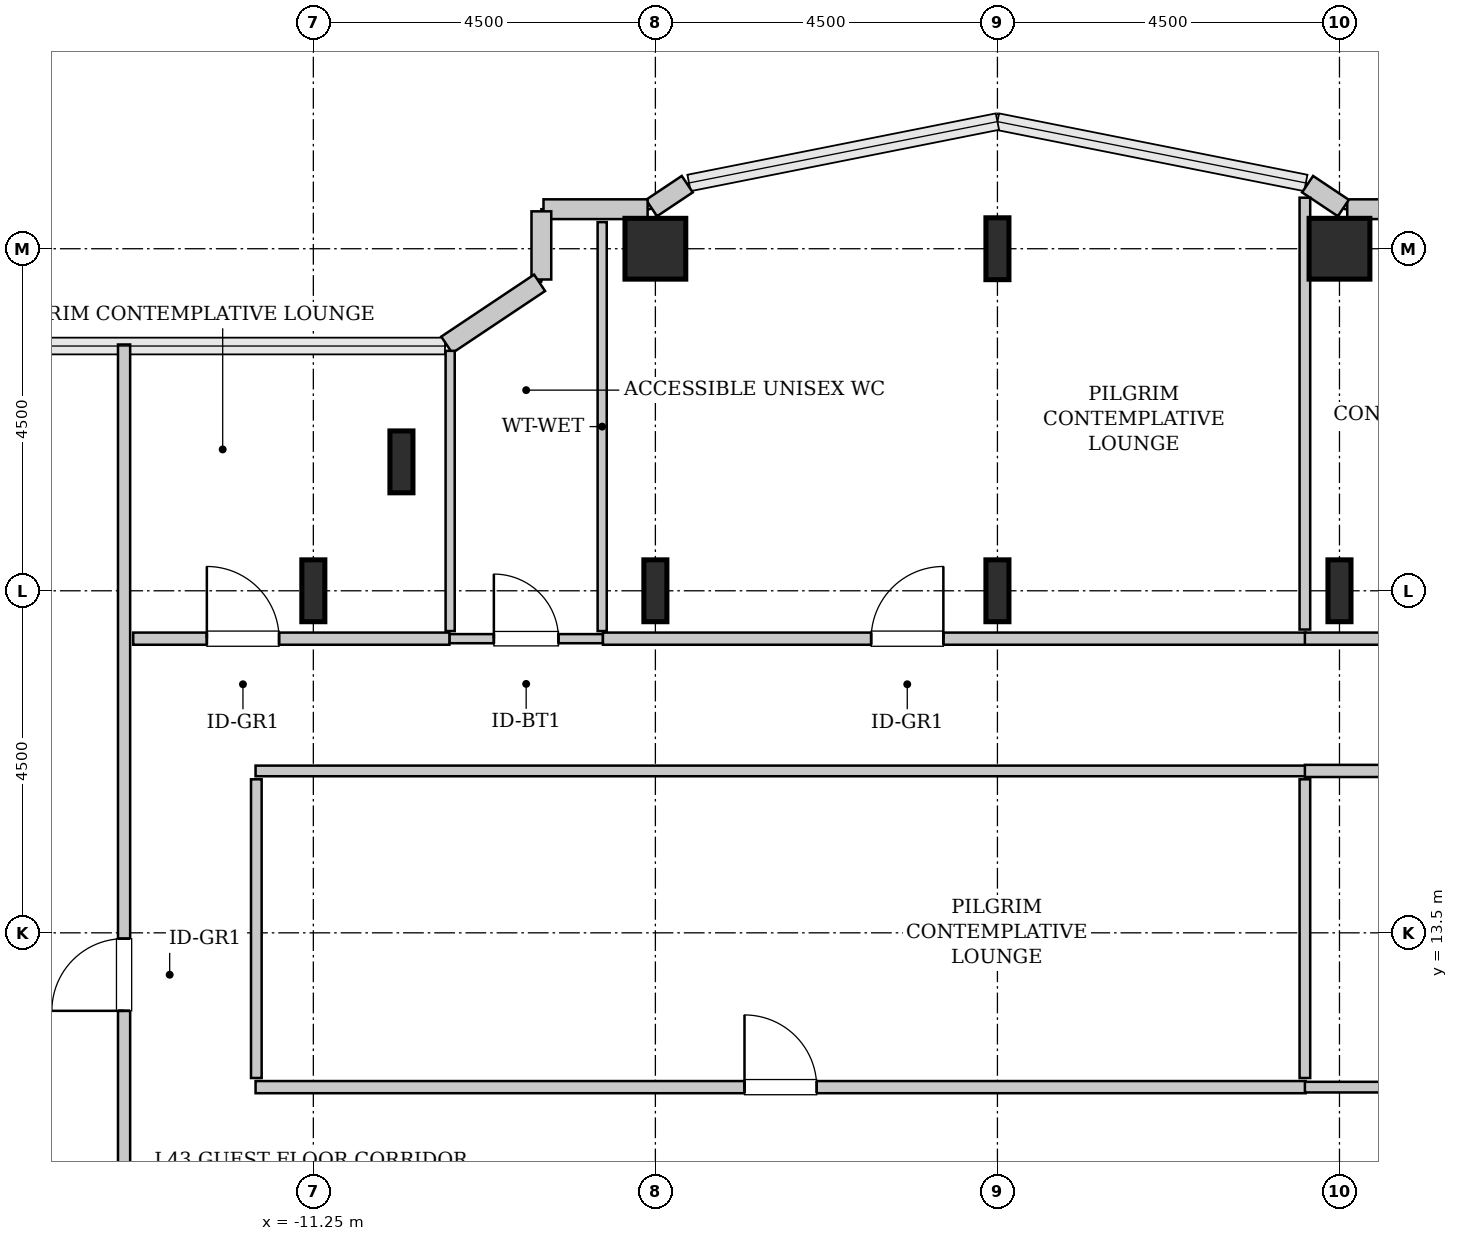
"""IFC4 building model, lengths in metres.
Left out: names, types, materials, properties, quantities, classifications, styles, units other than length and angle.
Written with IfcOpenShell. Run it as: python <this file> out.ifc"""

import sys

from ifc_helpers import new_model, si_unit, direction, frame, frame_2d, origin, origin_2d, place, context, subcontext, project, spatial, rectangle, hollow_rectangle, i_section, extrude, source, transform, mapped, element, fill, save


model = new_model("IFC4")
c1 = context("Model", 3, precision=1e-05, world=origin(), true_north=direction((0.0, 1.0)))
c2 = subcontext(c1, "Body", "Model", "MODEL_VIEW")
j1 = project(units=[si_unit("LENGTHUNIT", "METRE"), si_unit("PLANEANGLEUNIT", "RADIAN")], contexts=[c1])
p1 = place(None, origin())
s1 = spatial("IfcSite", under=j1, at=p1, CompositionType="ELEMENT")
p2 = place(p1, origin())
s2 = spatial("IfcBuilding", under=s1, at=p2, CompositionType="ELEMENT")
p3 = place(p2, frame((0.0, 0.0, 175.4)))
s3 = spatial("IfcBuildingStorey", under=s2, at=p3, CompositionType="ELEMENT", Elevation=175.4)
m1 = source(origin(), c2, "Body", "SweptSolid", [
    extrude(i_section(OverallWidth=0.303, OverallDepth=0.814, WebThickness=0.021, FlangeThickness=0.04, FilletRadius=0.03, at=origin_2d()), origin(), (0.0, 0.0, 1.0), 3.8),
])
for number, where, z_axis, x_axis in (
    (1, (-11.25, 18.0, 0.0), (0.0, 0.0, 1.0), (1.0, 0.0, 0.0)),
    (2, (-10.091, 19.696, 0.0), (0.0, 0.0, 1.0), (1.0, 0.0, 0.0)),
    (3, (-6.75, 18.0, 0.0), (0.0, 0.0, 1.0), (1.0, 0.0, 0.0)),
):
    element("IfcColumn", number, at=place(p3, frame(where, z_axis=z_axis, x_axis=x_axis)), inside=s3, PredefinedType="COLUMN", context=c2, shape_type="MappedRepresentation", body=[
        mapped(m1, transform((0.0, 0.0, 0.0), x_axis=(1.0, 0.0, 0.0), y_axis=(0.0, 1.0, 0.0), z_axis=(0.0, 0.0, 1.0), scale=1.0)),
    ])
m2 = source(origin(), c2, "Body", "SweptSolid", [
    extrude(hollow_rectangle(XDim=0.8, YDim=0.8, WallThickness=0.04, InnerFilletRadius=0.04, OuterFilletRadius=0.08, at=origin_2d()), origin(), (0.0, 0.0, 1.0), 3.8),
])
p4 = place(p3, frame((-6.75, 22.5, 0.0), z_axis=(0.0, 0.0, 1.0), x_axis=(1.0, 0.0, 0.0)))
e4 = element("IfcColumn", 4, at=p4, inside=s3, PredefinedType="COLUMN", context=c2, shape_type="MappedRepresentation", body=[
    mapped(m2, transform((0.0, 0.0, 0.0), x_axis=(1.0, 0.0, 0.0), y_axis=(0.0, 1.0, 0.0), z_axis=(0.0, 0.0, 1.0), scale=1.0)),
])
for number, where, z_axis, x_axis in (
    (5, (-2.25, 18.0, 0.0), (0.0, 0.0, 1.0), (1.0, 0.0, 0.0)),
    (6, (-2.25, 22.5, 0.0), (0.0, 0.0, 1.0), (1.0, 0.0, 0.0)),
    (7, (2.25, 18.0, 0.0), (0.0, 0.0, 1.0), (1.0, 0.0, 0.0)),
):
    element("IfcColumn", number, at=place(p3, frame(where, z_axis=z_axis, x_axis=x_axis)), inside=s3, PredefinedType="COLUMN", context=c2, shape_type="MappedRepresentation", body=[
        mapped(m1, transform((0.0, 0.0, 0.0), x_axis=(1.0, 0.0, 0.0), y_axis=(0.0, 1.0, 0.0), z_axis=(0.0, 0.0, 1.0), scale=1.0)),
    ])
p5 = place(p3, frame((2.25, 22.5, 0.0), z_axis=(0.0, 0.0, 1.0), x_axis=(1.0, 0.0, 0.0)))
e8 = element("IfcColumn", 8, at=p5, inside=s3, PredefinedType="COLUMN", context=c2, shape_type="MappedRepresentation", body=[
    mapped(m2, transform((0.0, 0.0, 0.0), x_axis=(1.0, 0.0, 0.0), y_axis=(0.0, 1.0, 0.0), z_axis=(0.0, 0.0, 1.0), scale=1.0)),
])
m3 = source(origin(), c2, "Body", "SweptSolid", [
    extrude(rectangle(XDim=1.37, YDim=0.26, at=frame_2d((0.685, 0.0))), origin(), (0.0, 0.0, 1.0), 3.55),
])
p6 = place(p3, frame((3.722, 23.02, 0.0), z_axis=(0.0, 0.0, 1.0), x_axis=(-1.0, 0.0, 0.0)))
e9 = element("IfcWall", 9, at=p6, inside=s3, PredefinedType="SOLIDWALL", context=c2, shape_type="MappedRepresentation", body=[
    mapped(m3, transform((0.0, 0.0, 0.0), x_axis=(1.0, 0.0, 0.0), y_axis=(0.0, 1.0, 0.0), z_axis=(0.0, 0.0, 1.0), scale=1.0)),
])
m4 = source(origin(), c2, "Body", "SweptSolid", [
    extrude(rectangle(XDim=0.565, YDim=0.26, at=frame_2d((0.283, 0.0))), origin(), (0.0, 0.0, 1.0), 3.55),
])
for number, where, z_axis, x_axis in (
    (10, (2.301, 23.036, 0.0), (0.0, 0.0, 1.0), (-0.832, 0.555, 0.0)),
    (11, (-6.331, 23.35, 0.0), (0.0, 0.0, 1.0), (-0.832, -0.555, 0.0)),
):
    element("IfcWall", number, at=place(p3, frame(where, z_axis=z_axis, x_axis=x_axis)), inside=s3, PredefinedType="SOLIDWALL", context=c2, shape_type="MappedRepresentation", body=[
        mapped(m4, transform((0.0, 0.0, 0.0), x_axis=(1.0, 0.0, 0.0), y_axis=(0.0, 1.0, 0.0), z_axis=(0.0, 0.0, 1.0), scale=1.0)),
    ])
p7 = place(p3, frame((-6.852, 23.02, 0.0), z_axis=(0.0, 0.0, 1.0), x_axis=(-1.0, 0.0, 0.0)))
e12 = element("IfcWall", 12, at=p7, inside=s3, PredefinedType="SOLIDWALL", context=c2, shape_type="MappedRepresentation", body=[
    mapped(m3, transform((0.0, 0.0, 0.0), x_axis=(1.0, 0.0, 0.0), y_axis=(0.0, 1.0, 0.0), z_axis=(0.0, 0.0, 1.0), scale=1.0)),
])
m5 = source(origin(), c2, "Body", "SweptSolid", [
    extrude(rectangle(XDim=0.897, YDim=0.26, at=frame_2d((0.448, 0.0))), origin(), (0.0, 0.0, 1.0), 3.55),
])
p8 = place(p3, frame((-8.25, 22.992, 0.0), z_axis=(0.0, 0.0, 1.0), x_axis=(0.0, -1.0, 0.0)))
e13 = element("IfcWall", 13, at=p8, inside=s3, PredefinedType="SOLIDWALL", context=c2, shape_type="MappedRepresentation", body=[
    mapped(m5, transform((0.0, 0.0, 0.0), x_axis=(1.0, 0.0, 0.0), y_axis=(0.0, 1.0, 0.0), z_axis=(0.0, 0.0, 1.0), scale=1.0)),
])
m6 = source(origin(), c2, "Body", "SweptSolid", [
    extrude(rectangle(XDim=1.469, YDim=0.26, at=frame_2d((0.734, 0.0))), origin(), (0.0, 0.0, 1.0), 3.55),
])
p9 = place(p3, frame((-8.273, 22.052, 0.0), z_axis=(0.0, 0.0, 1.0), x_axis=(-0.831461760506, -0.555581983884, 0.0)))
e14 = element("IfcWall", 14, at=p9, inside=s3, PredefinedType="SOLIDWALL", context=c2, shape_type="MappedRepresentation", body=[
    mapped(m6, transform((0.0, 0.0, 0.0), x_axis=(1.0, 0.0, 0.0), y_axis=(0.0, 1.0, 0.0), z_axis=(0.0, 0.0, 1.0), scale=1.0)),
])
m7 = source(origin(), c2, "Body", "SweptSolid", [
    extrude(rectangle(XDim=2.02, YDim=0.12, at=frame_2d((1.01, 0.0))), origin(), (0.0, 0.0, 1.0), 3.535),
])
p10 = place(p3, frame((-9.46, 17.37, 0.0), z_axis=(0.0, 0.0, 1.0), x_axis=(1.0, 0.0, 0.0)))
e15 = element("IfcWall", 15, at=p10, inside=s3, PredefinedType="PLUMBINGWALL", context=c2, shape_type="MappedRepresentation", body=[
    mapped(m7, transform((0.0, 0.0, 0.0), x_axis=(1.0, 0.0, 0.0), y_axis=(0.0, 1.0, 0.0), z_axis=(0.0, 0.0, 1.0), scale=1.0)),
])
p11 = place(p10, frame((0.585, 0.0, 0.0)))
e16 = element("IfcOpeningElement", 16, at=p11, cuts=e15, PredefinedType="OPENING", context=c2, shape_type="SweptSolid", body=[
    extrude(rectangle(XDim=0.85, YDim=2.1, at=frame_2d((0.425, 1.05))), frame((0.0, 0.07, 0.0), z_axis=(0.0, -1.0, 0.0), x_axis=(1.0, 0.0, 0.0)), (0.0, 0.0, 1.0), 0.14),
])
m8 = source(origin(), c2, "Body", "SweptSolid", [
    extrude(rectangle(XDim=5.38, YDim=0.12, at=frame_2d((2.69, 0.0))), origin(), (0.0, 0.0, 1.0), 3.535),
])
p12 = place(p3, frame((-7.45, 17.47, 0.0), z_axis=(0.0, 0.0, 1.0), x_axis=(0.0, 1.0, 0.0)))
e17 = element("IfcWall", 17, at=p12, inside=s3, PredefinedType="PLUMBINGWALL", context=c2, shape_type="MappedRepresentation", body=[
    mapped(m8, transform((0.0, 0.0, 0.0), x_axis=(1.0, 0.0, 0.0), y_axis=(0.0, 1.0, 0.0), z_axis=(0.0, 0.0, 1.0), scale=1.0)),
])
m9 = source(origin(), c2, "Body", "SweptSolid", [
    extrude(rectangle(XDim=3.687, YDim=0.12, at=frame_2d((1.843, 0.0))), origin(), (0.0, 0.0, 1.0), 3.535),
])
p13 = place(p3, frame((-9.45, 17.47, 0.0), z_axis=(0.0, 0.0, 1.0), x_axis=(0.0, 1.0, 0.0)))
e18 = element("IfcWall", 18, at=p13, inside=s3, PredefinedType="PLUMBINGWALL", context=c2, shape_type="MappedRepresentation", body=[
    mapped(m9, transform((0.0, 0.0, 0.0), x_axis=(1.0, 0.0, 0.0), y_axis=(0.0, 1.0, 0.0), z_axis=(0.0, 0.0, 1.0), scale=1.0)),
])
m10 = source(origin(), c2, "Body", "SweptSolid", [
    extrude(rectangle(XDim=12.752, YDim=0.16, at=frame_2d((6.376, 0.0))), origin(), (0.0, 0.0, 1.0), 3.535),
])
p14 = place(p3, frame((-13.74, 8.488, 0.0), z_axis=(0.0, 0.0, 1.0), x_axis=(0.0, 1.0, 0.0)))
e19 = element("IfcWall", 19, at=p14, inside=s3, PredefinedType="PARTITIONING", context=c2, shape_type="MappedRepresentation", body=[
    mapped(m10, transform((0.0, 0.0, 0.0), x_axis=(1.0, 0.0, 0.0), y_axis=(0.0, 1.0, 0.0), z_axis=(0.0, 0.0, 1.0), scale=1.0)),
])
p15 = place(p14, frame((3.986, 0.0, 0.0)))
e20 = element("IfcOpeningElement", 20, at=p15, cuts=e19, PredefinedType="OPENING", context=c2, shape_type="SweptSolid", body=[
    extrude(rectangle(XDim=0.95, YDim=2.1, at=frame_2d((0.475, 1.05))), frame((0.0, 0.09, 0.0), z_axis=(0.0, -1.0, 0.0), x_axis=(1.0, 0.0, 0.0)), (0.0, 0.0, 1.0), 0.18),
])
m11 = source(origin(), c2, "Body", "SweptSolid", [
    extrude(rectangle(XDim=13.815, YDim=0.16, at=frame_2d((6.907, 0.0))), origin(), (0.0, 0.0, 1.0), 3.535),
])
p16 = place(p3, frame((-12.01, 11.47, 0.0), z_axis=(0.0, 0.0, 1.0), x_axis=(1.0, 0.0, 0.0)))
e21 = element("IfcWall", 21, at=p16, inside=s3, PredefinedType="PARTITIONING", context=c2, shape_type="MappedRepresentation", body=[
    mapped(m11, transform((0.0, 0.0, 0.0), x_axis=(1.0, 0.0, 0.0), y_axis=(0.0, 1.0, 0.0), z_axis=(0.0, 0.0, 1.0), scale=1.0)),
])
p17 = place(p16, frame((6.433, 0.0, 0.0)))
e22 = element("IfcOpeningElement", 22, at=p17, cuts=e21, PredefinedType="OPENING", context=c2, shape_type="SweptSolid", body=[
    extrude(rectangle(XDim=0.95, YDim=2.1, at=frame_2d((0.475, 1.05))), frame((0.0, 0.09, 0.0), z_axis=(0.0, -1.0, 0.0), x_axis=(1.0, 0.0, 0.0)), (0.0, 0.0, 1.0), 0.18),
])
m12 = source(origin(), c2, "Body", "SweptSolid", [
    extrude(rectangle(XDim=13.815, YDim=0.14, at=frame_2d((6.907, 0.0))), origin(), (0.0, 0.0, 1.0), 3.535),
])
p18 = place(p3, frame((-12.01, 15.63, 0.0), z_axis=(0.0, 0.0, 1.0), x_axis=(1.0, 0.0, 0.0)))
e23 = element("IfcWall", 23, at=p18, inside=s3, PredefinedType="PARTITIONING", context=c2, shape_type="MappedRepresentation", body=[
    mapped(m12, transform((0.0, 0.0, 0.0), x_axis=(1.0, 0.0, 0.0), y_axis=(0.0, 1.0, 0.0), z_axis=(0.0, 0.0, 1.0), scale=1.0)),
])
m13 = source(origin(), c2, "Body", "SweptSolid", [
    extrude(rectangle(XDim=3.93, YDim=0.14, at=frame_2d((1.965, 0.0))), origin(), (0.0, 0.0, 1.0), 3.535),
])
for number, where, z_axis, x_axis in (
    (24, (-12.0, 11.59, 0.0), (0.0, 0.0, 1.0), (0.0, 1.0, 0.0)),
    (25, (1.795, 11.59, 0.0), (0.0, 0.0, 1.0), (0.0, 1.0, 0.0)),
):
    element("IfcWall", number, at=place(p3, frame(where, z_axis=z_axis, x_axis=x_axis)), inside=s3, PredefinedType="PARTITIONING", context=c2, shape_type="MappedRepresentation", body=[
        mapped(m13, transform((0.0, 0.0, 0.0), x_axis=(1.0, 0.0, 0.0), y_axis=(0.0, 1.0, 0.0), z_axis=(0.0, 0.0, 1.0), scale=1.0)),
    ])
m14 = source(origin(), c2, "Body", "SweptSolid", [
    extrude(rectangle(XDim=9.245, YDim=0.16, at=frame_2d((4.623, 0.0))), origin(), (0.0, 0.0, 1.0), 3.535),
])
p19 = place(p3, frame((-7.44, 17.37, 0.0), z_axis=(0.0, 0.0, 1.0), x_axis=(1.0, 0.0, 0.0)))
e26 = element("IfcWall", 26, at=p19, inside=s3, PredefinedType="PARTITIONING", context=c2, shape_type="MappedRepresentation", body=[
    mapped(m14, transform((0.0, 0.0, 0.0), x_axis=(1.0, 0.0, 0.0), y_axis=(0.0, 1.0, 0.0), z_axis=(0.0, 0.0, 1.0), scale=1.0)),
])
p20 = place(p19, frame((3.529, 0.0, 0.0)))
e27 = element("IfcOpeningElement", 27, at=p20, cuts=e26, PredefinedType="OPENING", context=c2, shape_type="SweptSolid", body=[
    extrude(rectangle(XDim=0.95, YDim=2.1, at=frame_2d((0.475, 1.05))), frame((0.0, 0.09, 0.0), z_axis=(0.0, -1.0, 0.0), x_axis=(1.0, 0.0, 0.0)), (0.0, 0.0, 1.0), 0.18),
])
m15 = source(origin(), c2, "Body", "SweptSolid", [
    extrude(rectangle(XDim=5.681, YDim=0.14, at=frame_2d((2.841, 0.0))), origin(), (0.0, 0.0, 1.0), 2.875),
])
p21 = place(p3, frame((1.795, 17.49, 0.0), z_axis=(0.0, 0.0, 1.0), x_axis=(0.0, 1.0, 0.0)))
e28 = element("IfcWall", 28, at=p21, inside=s3, PredefinedType="PARTITIONING", context=c2, shape_type="MappedRepresentation", body=[
    mapped(m15, transform((0.0, 0.0, 0.0), x_axis=(1.0, 0.0, 0.0), y_axis=(0.0, 1.0, 0.0), z_axis=(0.0, 0.0, 1.0), scale=1.0)),
])
m16 = source(origin(), c2, "Body", "SweptSolid", [
    extrude(rectangle(XDim=4.16, YDim=0.16, at=frame_2d((2.08, 0.0))), origin(), (0.0, 0.0, 1.0), 3.535),
])
p22 = place(p3, frame((-13.62, 17.37, 0.0), z_axis=(0.0, 0.0, 1.0), x_axis=(1.0, 0.0, 0.0)))
e29 = element("IfcWall", 29, at=p22, inside=s3, PredefinedType="PARTITIONING", context=c2, shape_type="MappedRepresentation", body=[
    mapped(m16, transform((0.0, 0.0, 0.0), x_axis=(1.0, 0.0, 0.0), y_axis=(0.0, 1.0, 0.0), z_axis=(0.0, 0.0, 1.0), scale=1.0)),
])
p23 = place(p22, frame((0.969, 0.0, 0.0)))
e30 = element("IfcOpeningElement", 30, at=p23, cuts=e29, PredefinedType="OPENING", context=c2, shape_type="SweptSolid", body=[
    extrude(rectangle(XDim=0.95, YDim=2.1, at=frame_2d((0.475, 1.05))), frame((0.0, 0.09, 0.0), z_axis=(0.0, -1.0, 0.0), x_axis=(1.0, 0.0, 0.0)), (0.0, 0.0, 1.0), 0.18),
])
m17 = source(origin(), c2, "Body", "SweptSolid", [
    extrude(rectangle(XDim=6.01, YDim=0.16, at=frame_2d((3.005, 0.0))), origin(), (0.0, 0.0, 1.0), 3.535),
])
p24 = place(p3, frame((1.795, 17.37, 0.0), z_axis=(0.0, 0.0, 1.0), x_axis=(1.0, 0.0, 0.0)))
e31 = element("IfcWall", 31, at=p24, inside=s3, PredefinedType="PARTITIONING", context=c2, shape_type="MappedRepresentation", body=[
    mapped(m17, transform((0.0, 0.0, 0.0), x_axis=(1.0, 0.0, 0.0), y_axis=(0.0, 1.0, 0.0), z_axis=(0.0, 0.0, 1.0), scale=1.0)),
])
p25 = place(p24, frame((2.53, 0.0, 0.0)))
e32 = element("IfcOpeningElement", 32, at=p25, cuts=e31, PredefinedType="OPENING", context=c2, shape_type="SweptSolid", body=[
    extrude(rectangle(XDim=0.95, YDim=2.1, at=frame_2d((0.475, 1.05))), frame((0.0, 0.09, 0.0), z_axis=(0.0, -1.0, 0.0), x_axis=(1.0, 0.0, 0.0)), (0.0, 0.0, 1.0), 0.18),
])
p26 = place(p3, frame((1.795, 15.63, 0.0), z_axis=(0.0, 0.0, 1.0), x_axis=(1.0, 0.0, 0.0)))
e33 = element("IfcWall", 33, at=p26, inside=s3, PredefinedType="PARTITIONING", context=c2, shape_type="MappedRepresentation", body=[
    mapped(m17, transform((0.0, 0.0, 0.0), x_axis=(1.0, 0.0, 0.0), y_axis=(0.0, 1.0, 0.0), z_axis=(0.0, 0.0, 1.0), scale=1.0)),
])
p27 = place(p26, frame((2.53, 0.0, 0.0)))
e34 = element("IfcOpeningElement", 34, at=p27, cuts=e33, PredefinedType="OPENING", context=c2, shape_type="SweptSolid", body=[
    extrude(rectangle(XDim=0.95, YDim=2.1, at=frame_2d((0.475, 1.05))), frame((0.0, 0.09, 0.0), z_axis=(0.0, -1.0, 0.0), x_axis=(1.0, 0.0, 0.0)), (0.0, 0.0, 1.0), 0.18),
])
m18 = source(origin(), c2, "Body", "SweptSolid", [
    extrude(rectangle(XDim=6.01, YDim=0.14, at=frame_2d((3.005, 0.0))), origin(), (0.0, 0.0, 1.0), 3.535),
])
p28 = place(p3, frame((1.795, 11.47, 0.0), z_axis=(0.0, 0.0, 1.0), x_axis=(1.0, 0.0, 0.0)))
e35 = element("IfcWall", 35, at=p28, inside=s3, PredefinedType="PARTITIONING", context=c2, shape_type="MappedRepresentation", body=[
    mapped(m18, transform((0.0, 0.0, 0.0), x_axis=(1.0, 0.0, 0.0), y_axis=(0.0, 1.0, 0.0), z_axis=(0.0, 0.0, 1.0), scale=1.0)),
])
m19 = source(origin(), c2, "Body", "SweptSolid", [
    extrude(rectangle(XDim=0.85, YDim=2.1, at=frame_2d((0.425, 1.05))), frame((0.0, 0.025, 0.0), z_axis=(0.0, -1.0, 0.0), x_axis=(1.0, 0.0, 0.0)), (0.0, 0.0, 1.0), 0.05),
])
p29 = place(p11, origin())
e36 = element("IfcDoor", 36, at=p29, inside=s3, OperationType="SINGLE_SWING_LEFT", PredefinedType="DOOR", context=c2, shape_type="MappedRepresentation", body=[
    mapped(m19, transform((0.0, 0.0, 0.0), x_axis=(1.0, 0.0, 0.0), y_axis=(0.0, 1.0, 0.0), z_axis=(0.0, 0.0, 1.0), scale=1.0)),
])
fill(e16, e36)
m20 = source(origin(), c2, "Body", "SweptSolid", [
    extrude(rectangle(XDim=0.95, YDim=2.1, at=frame_2d((0.475, 1.05))), frame((0.0, 0.025, 0.0), z_axis=(0.0, -1.0, 0.0), x_axis=(1.0, 0.0, 0.0)), (0.0, 0.0, 1.0), 0.05),
])
p30 = place(p15, origin())
e37 = element("IfcDoor", 37, at=p30, inside=s3, OperationType="SINGLE_SWING_LEFT", PredefinedType="DOOR", context=c2, shape_type="MappedRepresentation", body=[
    mapped(m20, transform((0.0, 0.0, 0.0), x_axis=(1.0, 0.0, 0.0), y_axis=(0.0, 1.0, 0.0), z_axis=(0.0, 0.0, 1.0), scale=1.0)),
])
fill(e20, e37)
p31 = place(p17, origin())
e38 = element("IfcDoor", 38, at=p31, inside=s3, OperationType="SINGLE_SWING_LEFT", PredefinedType="DOOR", context=c2, shape_type="MappedRepresentation", body=[
    mapped(m20, transform((0.0, 0.0, 0.0), x_axis=(1.0, 0.0, 0.0), y_axis=(0.0, 1.0, 0.0), z_axis=(0.0, 0.0, 1.0), scale=1.0)),
])
fill(e22, e38)
p32 = place(p20, origin())
e39 = element("IfcDoor", 39, at=p32, inside=s3, OperationType="SINGLE_SWING_RIGHT", PredefinedType="DOOR", context=c2, shape_type="MappedRepresentation", body=[
    mapped(m20, transform((0.0, 0.0, 0.0), x_axis=(1.0, 0.0, 0.0), y_axis=(0.0, 1.0, 0.0), z_axis=(0.0, 0.0, 1.0), scale=1.0)),
])
fill(e27, e39)
p33 = place(p23, origin())
e40 = element("IfcDoor", 40, at=p33, inside=s3, OperationType="SINGLE_SWING_LEFT", PredefinedType="DOOR", context=c2, shape_type="MappedRepresentation", body=[
    mapped(m20, transform((0.0, 0.0, 0.0), x_axis=(1.0, 0.0, 0.0), y_axis=(0.0, 1.0, 0.0), z_axis=(0.0, 0.0, 1.0), scale=1.0)),
])
fill(e30, e40)
save(model, sys.argv[1])
